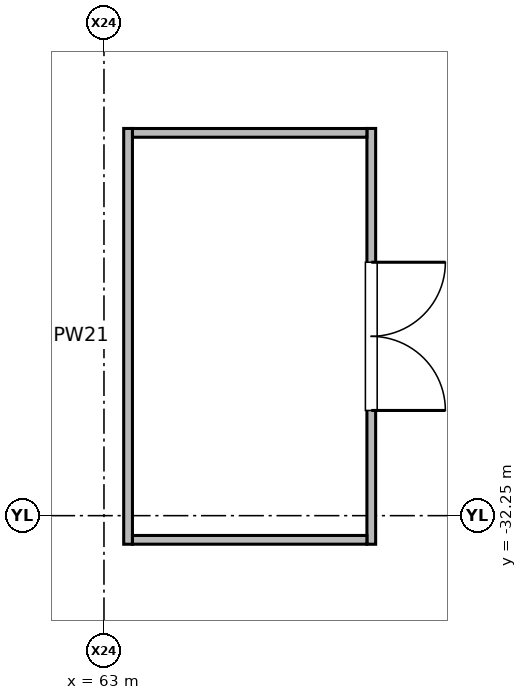
"""IFC4 building model, lengths in metres.
Left out: names, types, materials, properties, quantities, classifications, styles, units other than length and angle.
Written with IfcOpenShell. Run it as: python <this file> out.ifc"""

import sys

from ifc_helpers import new_model, si_unit, direction, frame, frame_2d, origin, place, context, subcontext, project, spatial, rectangle, extrude, element, fill, save


model = new_model("IFC4")
c1 = context("Model", 3, precision=1e-05, world=origin(), true_north=direction((0.0, 1.0)))
c2 = subcontext(c1, "Body", "Model", "MODEL_VIEW")
j1 = project(units=[si_unit("LENGTHUNIT", "METRE"), si_unit("PLANEANGLEUNIT", "RADIAN")], contexts=[c1])
p1 = place(None, origin())
s1 = spatial("IfcSite", under=j1, at=p1, CompositionType="ELEMENT")
p2 = place(p1, origin())
s2 = spatial("IfcBuilding", under=s1, at=p2, CompositionType="ELEMENT")
p3 = place(p2, frame((0.0, 0.0, 16.2)))
s3 = spatial("IfcBuildingStorey", under=s2, at=p3, CompositionType="ELEMENT", Elevation=16.2)
p4 = place(p3, frame((66.517, -27.156, 0.0), z_axis=(0.0, 0.0, 1.0), x_axis=(0.0, -1.0, 0.0)))
e1 = element("IfcWall", 1, at=p4, inside=s3, PredefinedType="PARTITIONING", context=c2, shape_type="SweptSolid", body=[
    extrude(rectangle(XDim=5.47, YDim=0.115, at=frame_2d((2.735, 0.0))), origin(), (0.0, 0.0, 1.0), 3.82),
])
p5 = place(p4, frame((1.76, 0.0, 0.0)))
e2 = element("IfcOpeningElement", 2, at=p5, cuts=e1, PredefinedType="OPENING", context=c2, shape_type="SweptSolid", body=[
    extrude(rectangle(XDim=1.95, YDim=2.35, at=frame_2d((0.975, 1.175))), frame((0.0, 0.067, 0.0), z_axis=(0.0, -1.0, 0.0), x_axis=(1.0, 0.0, 0.0)), (0.0, 0.0, 1.0), 0.135),
])
p6 = place(p3, frame((63.317, -32.626, 0.0), z_axis=(0.0, 0.0, 1.0), x_axis=(0.0, 1.0, 0.0)))
e3 = element("IfcWall", 3, at=p6, inside=s3, PredefinedType="PARTITIONING", context=c2, shape_type="SweptSolid", body=[
    extrude(rectangle(XDim=5.47, YDim=0.115, at=frame_2d((2.735, 0.0))), origin(), (0.0, 0.0, 1.0), 3.82),
])
for number, where, z_axis, x_axis in (
    (4, (63.375, -32.568, 0.0), (0.0, 0.0, 1.0), (1.0, 0.0, 0.0)),
    (5, (63.375, -27.214, 0.0), (0.0, 0.0, 1.0), (1.0, 0.0, 0.0)),
):
    element("IfcWall", number, at=place(p3, frame(where, z_axis=z_axis, x_axis=x_axis)), inside=s3, PredefinedType="PARTITIONING", context=c2, shape_type="SweptSolid", body=[
        extrude(rectangle(XDim=3.084, YDim=0.115, at=frame_2d((1.542, 0.0))), origin(), (0.0, 0.0, 1.0), 3.82),
    ])
p7 = place(p5, origin())
e6 = element("IfcDoor", 6, at=p7, inside=s3, OperationType="DOUBLE_DOOR_SINGLE_SWING", PredefinedType="DOOR", context=c2, shape_type="SweptSolid", body=[
    extrude(rectangle(XDim=1.95, YDim=2.35, at=frame_2d((0.975, 1.175))), frame((0.0, 0.025, 0.0), z_axis=(0.0, -1.0, 0.0), x_axis=(1.0, 0.0, 0.0)), (0.0, 0.0, 1.0), 0.05),
])
fill(e2, e6)
save(model, sys.argv[1])
